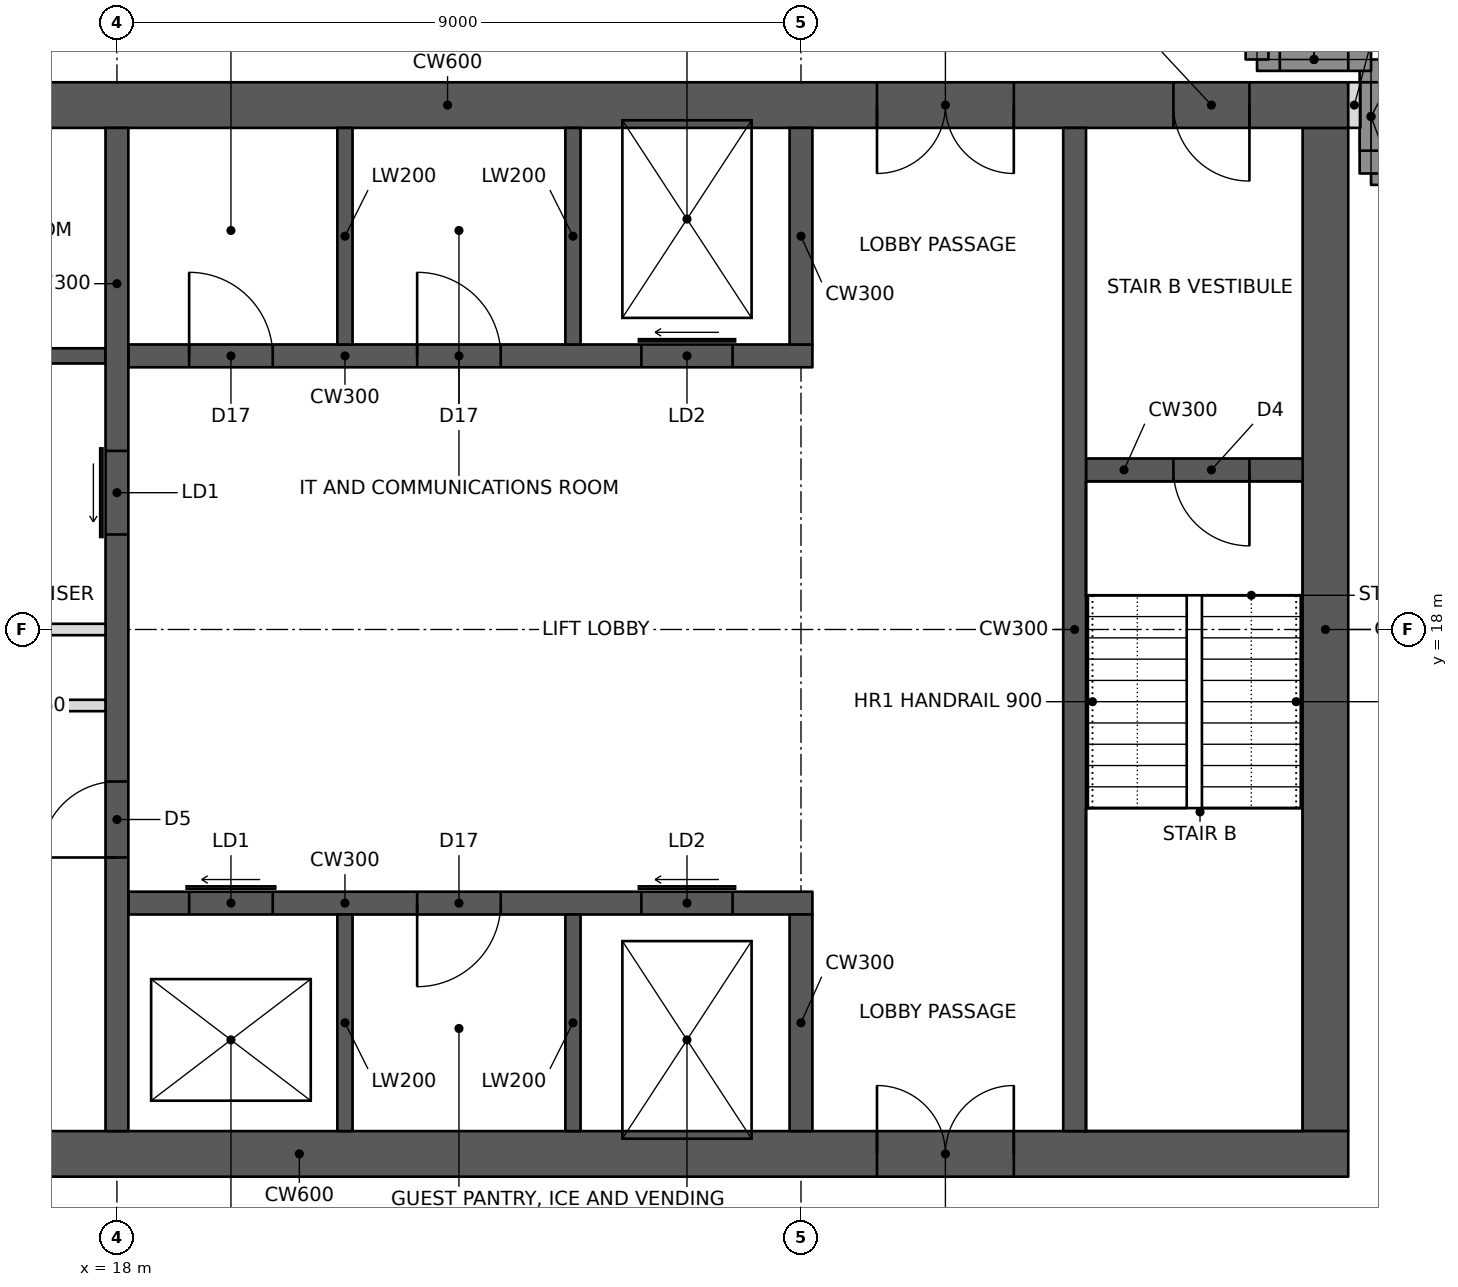
"""IFC4 building model, lengths in metres.
Left out: names, types, materials, properties, quantities, classifications, styles, units other than length and angle.
Written with IfcOpenShell. Run it as: python <this file> out.ifc"""

import sys

from ifc_helpers import new_model, si_unit, direction, frame, frame_2d, origin, place, context, subcontext, project, spatial, rectangle, extrude, element, fill, save


model = new_model("IFC4")
c1 = context("Model", 3, precision=1e-05, world=origin(), true_north=direction((0.0, 1.0)))
c2 = subcontext(c1, "Body", "Model", "MODEL_VIEW")
j1 = project(units=[si_unit("LENGTHUNIT", "METRE"), si_unit("PLANEANGLEUNIT", "RADIAN")], contexts=[c1])
p1 = place(None, origin())
s1 = spatial("IfcSite", under=j1, at=p1, CompositionType="ELEMENT")
p2 = place(p1, origin())
s2 = spatial("IfcBuilding", under=s1, at=p2, CompositionType="ELEMENT")
p3 = place(p2, frame((0.0, 0.0, 255.4)))
s3 = spatial("IfcBuildingStorey", under=s2, at=p3, CompositionType="ELEMENT", Elevation=255.4)
p4 = place(p3, frame((10.8, 11.1, 0.0), z_axis=(0.0, 0.0, 1.0), x_axis=(1.0, 0.0, 0.0)))
e1 = element("IfcWall", 1, at=p4, inside=s3, PredefinedType="SHEAR", context=c2, shape_type="SweptSolid", body=[
    extrude(rectangle(XDim=23.4, YDim=0.6, at=frame_2d((11.7, 0.0))), origin(), (0.0, 0.0, 1.0), 3.6),
])
p5 = place(p4, frame((1.0, 0.0, 0.0)))
e2 = element("IfcOpeningElement", 2, at=p5, cuts=e1, PredefinedType="OPENING", context=c2, shape_type="SweptSolid", body=[
    extrude(rectangle(XDim=1.0, YDim=2.1, at=frame_2d((0.5, 1.05))), frame((0.0, 0.31, 0.0), z_axis=(0.0, -1.0, 0.0), x_axis=(1.0, 0.0, 0.0)), (0.0, 0.0, 1.0), 0.62),
])
p6 = place(p4, frame((17.2, 0.0, 0.0)))
e3 = element("IfcOpeningElement", 3, at=p6, cuts=e1, PredefinedType="OPENING", context=c2, shape_type="SweptSolid", body=[
    extrude(rectangle(XDim=1.8, YDim=2.1, at=frame_2d((0.9, 1.05))), frame((0.0, 0.31, 0.0), z_axis=(0.0, -1.0, 0.0), x_axis=(1.0, 0.0, 0.0)), (0.0, 0.0, 1.0), 0.62),
])
p7 = place(p3, frame((10.8, 24.9, 0.0), z_axis=(0.0, 0.0, 1.0), x_axis=(1.0, 0.0, 0.0)))
e4 = element("IfcWall", 4, at=p7, inside=s3, PredefinedType="SHEAR", context=c2, shape_type="SweptSolid", body=[
    extrude(rectangle(XDim=23.4, YDim=0.6, at=frame_2d((11.7, 0.0))), origin(), (0.0, 0.0, 1.0), 3.6),
])
p8 = place(p7, frame((17.2, 0.0, 0.0)))
e5 = element("IfcOpeningElement", 5, at=p8, cuts=e4, PredefinedType="OPENING", context=c2, shape_type="SweptSolid", body=[
    extrude(rectangle(XDim=1.8, YDim=2.1, at=frame_2d((0.9, 1.05))), frame((0.0, 0.31, 0.0), z_axis=(0.0, -1.0, 0.0), x_axis=(1.0, 0.0, 0.0)), (0.0, 0.0, 1.0), 0.62),
])
p9 = place(p7, frame((21.1, 0.0, 0.0)))
e6 = element("IfcOpeningElement", 6, at=p9, cuts=e4, PredefinedType="OPENING", context=c2, shape_type="SweptSolid", body=[
    extrude(rectangle(XDim=1.0, YDim=2.1, at=frame_2d((0.5, 1.05))), frame((0.0, 0.31, 0.0), z_axis=(0.0, -1.0, 0.0), x_axis=(1.0, 0.0, 0.0)), (0.0, 0.0, 1.0), 0.62),
])
p10 = place(p7, frame((4.9, 0.0, 0.0)))
e7 = element("IfcOpeningElement", 7, at=p10, cuts=e4, PredefinedType="OPENING", context=c2, shape_type="SweptSolid", body=[
    extrude(rectangle(XDim=1.0, YDim=2.1, at=frame_2d((0.5, 1.05))), frame((0.0, 0.31, 0.0), z_axis=(0.0, -1.0, 0.0), x_axis=(1.0, 0.0, 0.0)), (0.0, 0.0, 1.0), 0.62),
])
p11 = place(p3, frame((33.9, 11.4, 0.0), z_axis=(0.0, 0.0, 1.0), x_axis=(0.0, 1.0, 0.0)))
e8 = element("IfcWall", 8, at=p11, inside=s3, PredefinedType="SHEAR", context=c2, shape_type="SweptSolid", body=[
    extrude(rectangle(XDim=13.2, YDim=0.6, at=frame_2d((6.6, 0.0))), origin(), (0.0, 0.0, 1.0), 3.6),
])
p12 = place(p3, frame((18.0, 11.4, 0.0), z_axis=(0.0, 0.0, 1.0), x_axis=(0.0, 1.0, 0.0)))
e9 = element("IfcWall", 9, at=p12, inside=s3, PredefinedType="SHEAR", context=c2, shape_type="SweptSolid", body=[
    extrude(rectangle(XDim=13.2, YDim=0.3, at=frame_2d((6.6, 0.0))), origin(), (0.0, 0.0, 1.0), 3.6),
])
p13 = place(p12, frame((3.6, 0.0, 0.0)))
e10 = element("IfcOpeningElement", 10, at=p13, cuts=e9, PredefinedType="OPENING", context=c2, shape_type="SweptSolid", body=[
    extrude(rectangle(XDim=1.0, YDim=2.1, at=frame_2d((0.5, 1.05))), frame((0.0, 0.16, 0.0), z_axis=(0.0, -1.0, 0.0), x_axis=(1.0, 0.0, 0.0)), (0.0, 0.0, 1.0), 0.32),
])
p14 = place(p12, frame((7.85, 0.0, 0.0)))
e11 = element("IfcOpeningElement", 11, at=p14, cuts=e9, PredefinedType="OPENING", context=c2, shape_type="SweptSolid", body=[
    extrude(rectangle(XDim=1.1, YDim=2.1, at=frame_2d((0.55, 1.05))), frame((0.0, 0.16, 0.0), z_axis=(0.0, -1.0, 0.0), x_axis=(1.0, 0.0, 0.0)), (0.0, 0.0, 1.0), 0.32),
])
p15 = place(p3, frame((14.55, 18.0, 0.0), z_axis=(0.0, 0.0, 1.0), x_axis=(1.0, 0.0, 0.0)))
e12 = element("IfcWall", 12, at=p15, inside=s3, PredefinedType="PARTITIONING", context=c2, shape_type="SweptSolid", body=[
    extrude(rectangle(XDim=3.3, YDim=0.15, at=frame_2d((1.65, 0.0))), origin(), (0.0, 0.0, 1.0), 3.4),
])
p16 = place(p3, frame((18.15, 14.4, 0.0), z_axis=(0.0, 0.0, 1.0), x_axis=(1.0, 0.0, 0.0)))
e13 = element("IfcWall", 13, at=p16, inside=s3, PredefinedType="SHEAR", context=c2, shape_type="SweptSolid", body=[
    extrude(rectangle(XDim=9.0, YDim=0.3, at=frame_2d((4.5, 0.0))), origin(), (0.0, 0.0, 1.0), 3.6),
])
p17 = place(p16, frame((0.8, 0.0, 0.0)))
e14 = element("IfcOpeningElement", 14, at=p17, cuts=e13, PredefinedType="OPENING", context=c2, shape_type="SweptSolid", body=[
    extrude(rectangle(XDim=1.1, YDim=2.1, at=frame_2d((0.55, 1.05))), frame((0.0, 0.16, 0.0), z_axis=(0.0, -1.0, 0.0), x_axis=(1.0, 0.0, 0.0)), (0.0, 0.0, 1.0), 0.32),
])
p18 = place(p16, frame((6.75, 0.0, 0.0)))
e15 = element("IfcOpeningElement", 15, at=p18, cuts=e13, PredefinedType="OPENING", context=c2, shape_type="SweptSolid", body=[
    extrude(rectangle(XDim=1.2, YDim=2.1, at=frame_2d((0.6, 1.05))), frame((0.0, 0.16, 0.0), z_axis=(0.0, -1.0, 0.0), x_axis=(1.0, 0.0, 0.0)), (0.0, 0.0, 1.0), 0.32),
])
p19 = place(p16, frame((3.8, 0.0, 0.0)))
e16 = element("IfcOpeningElement", 16, at=p19, cuts=e13, PredefinedType="OPENING", context=c2, shape_type="SweptSolid", body=[
    extrude(rectangle(XDim=1.1, YDim=2.1, at=frame_2d((0.55, 1.05))), frame((0.0, 0.16, 0.0), z_axis=(0.0, -1.0, 0.0), x_axis=(1.0, 0.0, 0.0)), (0.0, 0.0, 1.0), 0.32),
])
p20 = place(p3, frame((27.0, 11.4, 0.0), z_axis=(0.0, 0.0, 1.0), x_axis=(0.0, 1.0, 0.0)))
e17 = element("IfcWall", 17, at=p20, inside=s3, PredefinedType="SHEAR", context=c2, shape_type="SweptSolid", body=[
    extrude(rectangle(XDim=2.85, YDim=0.3, at=frame_2d((1.425, 0.0))), origin(), (0.0, 0.0, 1.0), 3.6),
])
for number, where, z_axis, x_axis in (
    (18, (21.0, 11.4, 0.0), (0.0, 0.0, 1.0), (0.0, 1.0, 0.0)),
    (19, (24.0, 11.4, 0.0), (0.0, 0.0, 1.0), (0.0, 1.0, 0.0)),
):
    element("IfcWall", number, at=place(p3, frame(where, z_axis=z_axis, x_axis=x_axis)), inside=s3, PredefinedType="SHEAR", context=c2, shape_type="SweptSolid", body=[
        extrude(rectangle(XDim=2.85, YDim=0.2, at=frame_2d((1.425, 0.0))), origin(), (0.0, 0.0, 1.0), 3.6),
    ])
p21 = place(p3, frame((18.15, 21.6, 0.0), z_axis=(0.0, 0.0, 1.0), x_axis=(1.0, 0.0, 0.0)))
e20 = element("IfcWall", 20, at=p21, inside=s3, PredefinedType="SHEAR", context=c2, shape_type="SweptSolid", body=[
    extrude(rectangle(XDim=9.0, YDim=0.3, at=frame_2d((4.5, 0.0))), origin(), (0.0, 0.0, 1.0), 3.6),
])
p22 = place(p21, frame((6.75, 0.0, 0.0)))
e21 = element("IfcOpeningElement", 21, at=p22, cuts=e20, PredefinedType="OPENING", context=c2, shape_type="SweptSolid", body=[
    extrude(rectangle(XDim=1.2, YDim=2.1, at=frame_2d((0.6, 1.05))), frame((0.0, 0.16, 0.0), z_axis=(0.0, -1.0, 0.0), x_axis=(1.0, 0.0, 0.0)), (0.0, 0.0, 1.0), 0.32),
])
p23 = place(p21, frame((0.8, 0.0, 0.0)))
e22 = element("IfcOpeningElement", 22, at=p23, cuts=e20, PredefinedType="OPENING", context=c2, shape_type="SweptSolid", body=[
    extrude(rectangle(XDim=1.1, YDim=2.1, at=frame_2d((0.55, 1.05))), frame((0.0, 0.16, 0.0), z_axis=(0.0, -1.0, 0.0), x_axis=(1.0, 0.0, 0.0)), (0.0, 0.0, 1.0), 0.32),
])
p24 = place(p21, frame((3.8, 0.0, 0.0)))
e23 = element("IfcOpeningElement", 23, at=p24, cuts=e20, PredefinedType="OPENING", context=c2, shape_type="SweptSolid", body=[
    extrude(rectangle(XDim=1.1, YDim=2.1, at=frame_2d((0.55, 1.05))), frame((0.0, 0.16, 0.0), z_axis=(0.0, -1.0, 0.0), x_axis=(1.0, 0.0, 0.0)), (0.0, 0.0, 1.0), 0.32),
])
p25 = place(p3, frame((27.0, 21.75, 0.0), z_axis=(0.0, 0.0, 1.0), x_axis=(0.0, 1.0, 0.0)))
e24 = element("IfcWall", 24, at=p25, inside=s3, PredefinedType="SHEAR", context=c2, shape_type="SweptSolid", body=[
    extrude(rectangle(XDim=2.85, YDim=0.3, at=frame_2d((1.425, 0.0))), origin(), (0.0, 0.0, 1.0), 3.6),
])
for number, where, z_axis, x_axis in (
    (25, (21.0, 21.75, 0.0), (0.0, 0.0, 1.0), (0.0, 1.0, 0.0)),
    (26, (24.0, 21.75, 0.0), (0.0, 0.0, 1.0), (0.0, 1.0, 0.0)),
):
    element("IfcWall", number, at=place(p3, frame(where, z_axis=z_axis, x_axis=x_axis)), inside=s3, PredefinedType="SHEAR", context=c2, shape_type="SweptSolid", body=[
        extrude(rectangle(XDim=2.85, YDim=0.2, at=frame_2d((1.425, 0.0))), origin(), (0.0, 0.0, 1.0), 3.6),
    ])
p26 = place(p3, frame((30.6, 11.4, 0.0), z_axis=(0.0, 0.0, 1.0), x_axis=(0.0, 1.0, 0.0)))
e27 = element("IfcWall", 27, at=p26, inside=s3, PredefinedType="SHEAR", context=c2, shape_type="SweptSolid", body=[
    extrude(rectangle(XDim=13.2, YDim=0.3, at=frame_2d((6.6, 0.0))), origin(), (0.0, 0.0, 1.0), 3.6),
])
p27 = place(p3, frame((30.75, 20.1, 0.0), z_axis=(0.0, 0.0, 1.0), x_axis=(1.0, 0.0, 0.0)))
e28 = element("IfcWall", 28, at=p27, inside=s3, PredefinedType="SHEAR", context=c2, shape_type="SweptSolid", body=[
    extrude(rectangle(XDim=2.85, YDim=0.3, at=frame_2d((1.425, 0.0))), origin(), (0.0, 0.0, 1.0), 3.6),
])
p28 = place(p27, frame((1.15, 0.0, 0.0)))
e29 = element("IfcOpeningElement", 29, at=p28, cuts=e28, PredefinedType="OPENING", context=c2, shape_type="SweptSolid", body=[
    extrude(rectangle(XDim=1.0, YDim=2.1, at=frame_2d((0.5, 1.05))), frame((0.0, 0.16, 0.0), z_axis=(0.0, -1.0, 0.0), x_axis=(1.0, 0.0, 0.0)), (0.0, 0.0, 1.0), 0.32),
])
p29 = place(p3, frame((14.55, 21.6, 0.0), z_axis=(0.0, 0.0, 1.0), x_axis=(1.0, 0.0, 0.0)))
e30 = element("IfcWall", 30, at=p29, inside=s3, PredefinedType="SHEAR", context=c2, shape_type="SweptSolid", body=[
    extrude(rectangle(XDim=3.3, YDim=0.2, at=frame_2d((1.65, 0.0))), origin(), (0.0, 0.0, 1.0), 3.6),
])
p30 = place(p3, frame((36.0, 24.0, 0.0), z_axis=(0.0, 0.0, 1.0), x_axis=(-1.0, 0.0, 0.0)))
e31 = element("IfcWall", 31, at=p30, inside=s3, PredefinedType="SOLIDWALL", context=c2, shape_type="SweptSolid", body=[
    extrude(rectangle(XDim=1.5, YDim=0.3, at=frame_2d((0.75, 0.0))), origin(), (0.0, 0.0, 1.0), 2.62),
])
p31 = place(p3, frame((34.5, 24.0, 0.0), z_axis=(0.0, 0.0, 1.0), x_axis=(0.0, 1.0, 0.0)))
e32 = element("IfcWall", 32, at=p31, inside=s3, PredefinedType="SOLIDWALL", context=c2, shape_type="SweptSolid", body=[
    extrude(rectangle(XDim=1.5, YDim=0.3, at=frame_2d((0.75, 0.0))), origin(), (0.0, 0.0, 1.0), 3.4),
])
p32 = place(p31, frame((0.3, 0.0, 0.6)))
e33 = element("IfcOpeningElement", 33, at=p32, cuts=e32, PredefinedType="OPENING", context=c2, shape_type="SweptSolid", body=[
    extrude(rectangle(XDim=0.9, YDim=2.2, at=frame_2d((0.45, 1.1))), frame((0.0, 0.16, 0.0), z_axis=(0.0, -1.0, 0.0), x_axis=(1.0, 0.0, 0.0)), (0.0, 0.0, 1.0), 0.32),
])
p33 = place(p3, frame((34.5, 25.5, 0.0), z_axis=(0.0, 0.0, 1.0), x_axis=(-1.0, 0.0, 0.0)))
e34 = element("IfcWall", 34, at=p33, inside=s3, PredefinedType="SOLIDWALL", context=c2, shape_type="SweptSolid", body=[
    extrude(rectangle(XDim=1.5, YDim=0.3, at=frame_2d((0.75, 0.0))), origin(), (0.0, 0.0, 1.0), 3.4),
])
p34 = place(p33, frame((0.3, 0.0, 0.6)))
e35 = element("IfcOpeningElement", 35, at=p34, cuts=e34, PredefinedType="OPENING", context=c2, shape_type="SweptSolid", body=[
    extrude(rectangle(XDim=0.9, YDim=2.2, at=frame_2d((0.45, 1.1))), frame((0.0, 0.16, 0.0), z_axis=(0.0, -1.0, 0.0), x_axis=(1.0, 0.0, 0.0)), (0.0, 0.0, 1.0), 0.32),
])
p35 = place(p3, frame((33.0, 25.5, 0.0), z_axis=(0.0, 0.0, 1.0), x_axis=(0.0, 1.0, 0.0)))
e36 = element("IfcWall", 36, at=p35, inside=s3, PredefinedType="SOLIDWALL", context=c2, shape_type="SweptSolid", body=[
    extrude(rectangle(XDim=1.5, YDim=0.3, at=frame_2d((0.75, 0.0))), origin(), (0.0, 0.0, 1.0), 2.62),
])
p36 = place(p3, frame((34.2, 24.9, 0.0), z_axis=(0.0, 0.0, 1.0), x_axis=(1.0, 0.0, 0.0)))
e37 = element("IfcWall", 37, at=p36, inside=s3, PredefinedType="PARTITIONING", context=c2, shape_type="SweptSolid", body=[
    extrude(rectangle(XDim=0.16, YDim=0.6, at=frame_2d((0.08, 0.0))), origin(), (0.0, 0.0, 1.0), 3.4),
])
p37 = place(p3, frame((14.55, 17.0, 0.0), z_axis=(0.0, 0.0, 1.0), x_axis=(1.0, 0.0, 0.0)))
e38 = element("IfcWall", 38, at=p37, inside=s3, PredefinedType="PARTITIONING", context=c2, shape_type="SweptSolid", body=[
    extrude(rectangle(XDim=3.3, YDim=0.15, at=frame_2d((1.65, 0.0))), origin(), (0.0, 0.0, 1.0), 3.4),
])
p38 = place(p37, frame((0.3, 0.0, 0.0)))
e39 = element("IfcOpeningElement", 39, at=p38, cuts=e38, PredefinedType="OPENING", context=c2, shape_type="SweptSolid", body=[
    extrude(rectangle(XDim=1.0, YDim=2.1, at=frame_2d((0.5, 1.05))), frame((0.0, 0.085, 0.0), z_axis=(0.0, -1.0, 0.0), x_axis=(1.0, 0.0, 0.0)), (0.0, 0.0, 1.0), 0.17),
])
p39 = place(p32, origin())
e40 = element("IfcWindow", 40, at=p39, inside=s3, PartitioningType="SINGLE_PANEL", PredefinedType="WINDOW", context=c2, shape_type="SweptSolid", body=[
    extrude(rectangle(XDim=0.9, YDim=2.2, at=frame_2d((0.45, 1.1))), frame((0.0, 0.03, 0.0), z_axis=(0.0, -1.0, 0.0), x_axis=(1.0, 0.0, 0.0)), (0.0, 0.0, 1.0), 0.06),
])
fill(e33, e40)
p40 = place(p34, origin())
e41 = element("IfcWindow", 41, at=p40, inside=s3, PartitioningType="SINGLE_PANEL", PredefinedType="WINDOW", context=c2, shape_type="SweptSolid", body=[
    extrude(rectangle(XDim=0.9, YDim=2.2, at=frame_2d((0.45, 1.1))), frame((0.0, 0.03, 0.0), z_axis=(0.0, -1.0, 0.0), x_axis=(1.0, 0.0, 0.0)), (0.0, 0.0, 1.0), 0.06),
])
fill(e35, e41)
p41 = place(p6, origin())
e42 = element("IfcDoor", 42, at=p41, inside=s3, OperationType="DOUBLE_DOOR_SINGLE_SWING", PredefinedType="DOOR", context=c2, shape_type="SweptSolid", body=[
    extrude(rectangle(XDim=1.8, YDim=2.1, at=frame_2d((0.9, 1.05))), frame((0.0, 0.025, 0.0), z_axis=(0.0, -1.0, 0.0), x_axis=(1.0, 0.0, 0.0)), (0.0, 0.0, 1.0), 0.05),
])
fill(e3, e42)
p42 = place(p8, frame((1.8, 0.0, 0.0), z_axis=(0.0, 0.0, 1.0), x_axis=(-1.0, 0.0, 0.0)))
e43 = element("IfcDoor", 43, at=p42, inside=s3, OperationType="DOUBLE_DOOR_SINGLE_SWING", PredefinedType="DOOR", context=c2, shape_type="SweptSolid", body=[
    extrude(rectangle(XDim=1.8, YDim=2.1, at=frame_2d((0.9, 1.05))), frame((0.0, 0.025, 0.0), z_axis=(0.0, -1.0, 0.0), x_axis=(1.0, 0.0, 0.0)), (0.0, 0.0, 1.0), 0.05),
])
fill(e5, e43)
p43 = place(p9, frame((1.0, 0.0, 0.0), z_axis=(0.0, 0.0, 1.0), x_axis=(-1.0, 0.0, 0.0)))
e44 = element("IfcDoor", 44, at=p43, inside=s3, OperationType="SINGLE_SWING_LEFT", PredefinedType="DOOR", context=c2, shape_type="SweptSolid", body=[
    extrude(rectangle(XDim=1.0, YDim=2.1, at=frame_2d((0.5, 1.05))), frame((0.0, 0.025, 0.0), z_axis=(0.0, -1.0, 0.0), x_axis=(1.0, 0.0, 0.0)), (0.0, 0.0, 1.0), 0.05),
])
fill(e6, e44)
p44 = place(p28, frame((1.0, 0.0, 0.0), z_axis=(0.0, 0.0, 1.0), x_axis=(-1.0, 0.0, 0.0)))
e45 = element("IfcDoor", 45, at=p44, inside=s3, OperationType="SINGLE_SWING_LEFT", PredefinedType="DOOR", context=c2, shape_type="SweptSolid", body=[
    extrude(rectangle(XDim=1.0, YDim=2.1, at=frame_2d((0.5, 1.05))), frame((0.0, 0.025, 0.0), z_axis=(0.0, -1.0, 0.0), x_axis=(1.0, 0.0, 0.0)), (0.0, 0.0, 1.0), 0.05),
])
fill(e29, e45)
p45 = place(p13, origin())
e46 = element("IfcDoor", 46, at=p45, inside=s3, OperationType="SINGLE_SWING_LEFT", PredefinedType="DOOR", context=c2, shape_type="SweptSolid", body=[
    extrude(rectangle(XDim=1.0, YDim=2.1, at=frame_2d((0.5, 1.05))), frame((0.0, 0.025, 0.0), z_axis=(0.0, -1.0, 0.0), x_axis=(1.0, 0.0, 0.0)), (0.0, 0.0, 1.0), 0.05),
])
fill(e10, e46)
p46 = place(p17, origin())
e47 = element("IfcDoor", 47, at=p46, inside=s3, OperationType="SLIDING_TO_LEFT", PredefinedType="DOOR", context=c2, shape_type="SweptSolid", body=[
    extrude(rectangle(XDim=1.1, YDim=2.1, at=frame_2d((0.55, 1.05))), frame((0.0, 0.025, 0.0), z_axis=(0.0, -1.0, 0.0), x_axis=(1.0, 0.0, 0.0)), (0.0, 0.0, 1.0), 0.05),
])
fill(e14, e47)
p47 = place(p14, origin())
e48 = element("IfcDoor", 48, at=p47, inside=s3, OperationType="SLIDING_TO_LEFT", PredefinedType="DOOR", context=c2, shape_type="SweptSolid", body=[
    extrude(rectangle(XDim=1.1, YDim=2.1, at=frame_2d((0.55, 1.05))), frame((0.0, 0.025, 0.0), z_axis=(0.0, -1.0, 0.0), x_axis=(1.0, 0.0, 0.0)), (0.0, 0.0, 1.0), 0.05),
])
fill(e11, e48)
p48 = place(p18, origin())
e49 = element("IfcDoor", 49, at=p48, inside=s3, OperationType="SLIDING_TO_LEFT", PredefinedType="DOOR", context=c2, shape_type="SweptSolid", body=[
    extrude(rectangle(XDim=1.2, YDim=2.1, at=frame_2d((0.6, 1.05))), frame((0.0, 0.025, 0.0), z_axis=(0.0, -1.0, 0.0), x_axis=(1.0, 0.0, 0.0)), (0.0, 0.0, 1.0), 0.05),
])
fill(e15, e49)
p49 = place(p22, origin())
e50 = element("IfcDoor", 50, at=p49, inside=s3, OperationType="SLIDING_TO_LEFT", PredefinedType="DOOR", context=c2, shape_type="SweptSolid", body=[
    extrude(rectangle(XDim=1.2, YDim=2.1, at=frame_2d((0.6, 1.05))), frame((0.0, 0.025, 0.0), z_axis=(0.0, -1.0, 0.0), x_axis=(1.0, 0.0, 0.0)), (0.0, 0.0, 1.0), 0.05),
])
fill(e21, e50)
p50 = place(p23, origin())
e51 = element("IfcDoor", 51, at=p50, inside=s3, OperationType="SINGLE_SWING_LEFT", PredefinedType="DOOR", context=c2, shape_type="SweptSolid", body=[
    extrude(rectangle(XDim=1.1, YDim=2.1, at=frame_2d((0.55, 1.05))), frame((0.0, 0.025, 0.0), z_axis=(0.0, -1.0, 0.0), x_axis=(1.0, 0.0, 0.0)), (0.0, 0.0, 1.0), 0.05),
])
fill(e22, e51)
p51 = place(p24, origin())
e52 = element("IfcDoor", 52, at=p51, inside=s3, OperationType="SINGLE_SWING_LEFT", PredefinedType="DOOR", context=c2, shape_type="SweptSolid", body=[
    extrude(rectangle(XDim=1.1, YDim=2.1, at=frame_2d((0.55, 1.05))), frame((0.0, 0.025, 0.0), z_axis=(0.0, -1.0, 0.0), x_axis=(1.0, 0.0, 0.0)), (0.0, 0.0, 1.0), 0.05),
])
fill(e23, e52)
p52 = place(p19, frame((1.1, 0.0, 0.0), z_axis=(0.0, 0.0, 1.0), x_axis=(-1.0, 0.0, 0.0)))
e53 = element("IfcDoor", 53, at=p52, inside=s3, OperationType="SINGLE_SWING_RIGHT", PredefinedType="DOOR", context=c2, shape_type="SweptSolid", body=[
    extrude(rectangle(XDim=1.1, YDim=2.1, at=frame_2d((0.55, 1.05))), frame((0.0, 0.025, 0.0), z_axis=(0.0, -1.0, 0.0), x_axis=(1.0, 0.0, 0.0)), (0.0, 0.0, 1.0), 0.05),
])
fill(e16, e53)
save(model, sys.argv[1])
